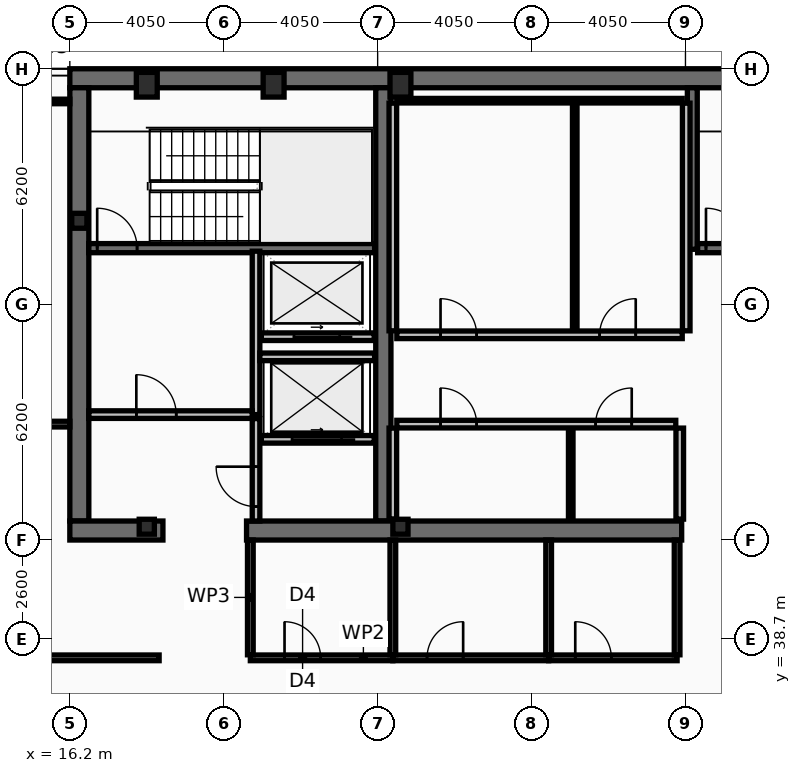
"""IFC4 building model, lengths in metres.
Left out: names, types, materials, properties, quantities, classifications, styles, units other than length and angle.
Written with IfcOpenShell. Run it as: python <this file> out.ifc"""

import sys

from ifc_helpers import new_model, si_unit, direction, frame, frame_2d, origin, origin_2d, place, context, subcontext, project, spatial, rectangle, hollow_rectangle, i_section, extrude, element, fill, save


model = new_model("IFC4")
c1 = context("Model", 3, precision=1e-05, world=origin(), true_north=direction((0.0, 1.0)))
c2 = subcontext(c1, "Body", "Model", "MODEL_VIEW")
j1 = project(units=[si_unit("LENGTHUNIT", "METRE"), si_unit("PLANEANGLEUNIT", "RADIAN")], contexts=[c1])
p1 = place(None, origin())
s1 = spatial("IfcSite", under=j1, at=p1, CompositionType="ELEMENT")
p2 = place(p1, origin())
s2 = spatial("IfcBuilding", under=s1, at=p2, CompositionType="ELEMENT")
p3 = place(p2, frame((0.0, 0.0, 298.6)))
s3 = spatial("IfcBuildingStorey", under=s2, at=p3, CompositionType="ELEMENT", Elevation=298.6)
p4 = place(p3, frame((16.2, 53.45, 0.0), z_axis=(0.0, 0.0, 1.0), x_axis=(1.0, 0.0, 0.0)))
e1 = element("IfcWall", 1, at=p4, inside=s3, PredefinedType="SHEAR", context=c2, shape_type="SweptSolid", body=[
    extrude(rectangle(XDim=40.5, YDim=0.5, at=frame_2d((20.25, 0.0))), origin(), (0.0, 0.0, 1.0), 3.44),
])
p5 = place(p3, frame((16.45, 41.8, 0.0), z_axis=(0.0, 0.0, 1.0), x_axis=(0.0, 1.0, 0.0)))
e2 = element("IfcWall", 2, at=p5, inside=s3, PredefinedType="SHEAR", context=c2, shape_type="SweptSolid", body=[
    extrude(rectangle(XDim=11.4, YDim=0.5, at=frame_2d((5.7, 0.0))), origin(), (0.0, 0.0, 1.0), 3.44),
])
p6 = place(p3, frame((24.45, 41.8, 0.0), z_axis=(0.0, 0.0, 1.0), x_axis=(0.0, 1.0, 0.0)))
e3 = element("IfcWall", 3, at=p6, inside=s3, PredefinedType="SHEAR", context=c2, shape_type="SweptSolid", body=[
    extrude(rectangle(XDim=11.4, YDim=0.4, at=frame_2d((5.7, 0.0))), origin(), (0.0, 0.0, 1.0), 3.44),
])
p7 = place(p3, frame((18.65, 41.55, 0.0), z_axis=(0.0, 0.0, 1.0), x_axis=(-1.0, 0.0, 0.0)))
e4 = element("IfcWall", 4, at=p7, inside=s3, PredefinedType="SHEAR", context=c2, shape_type="SweptSolid", body=[
    extrude(rectangle(XDim=2.45, YDim=0.5, at=frame_2d((1.225, 0.0))), origin(), (0.0, 0.0, 1.0), 3.44),
])
p8 = place(p3, frame((32.3, 41.55, 0.0), z_axis=(0.0, 0.0, 1.0), x_axis=(-1.0, 0.0, 0.0)))
e5 = element("IfcWall", 5, at=p8, inside=s3, PredefinedType="SHEAR", context=c2, shape_type="SweptSolid", body=[
    extrude(rectangle(XDim=11.45, YDim=0.5, at=frame_2d((5.725, 0.0))), origin(), (0.0, 0.0, 1.0), 3.44),
])
p9 = place(p3, frame((32.58, 48.95, 0.0), z_axis=(0.0, 0.0, 1.0), x_axis=(0.0, 1.0, 0.0)))
e6 = element("IfcWall", 6, at=p9, inside=s3, PredefinedType="SHEAR", context=c2, shape_type="SweptSolid", body=[
    extrude(rectangle(XDim=4.25, YDim=0.26, at=frame_2d((2.125, 0.0))), origin(), (0.0, 0.0, 1.0), 3.44),
])
p10 = place(p3, frame((16.7, 48.98, 0.0), z_axis=(0.0, 0.0, 1.0), x_axis=(1.0, 0.0, 0.0)))
e7 = element("IfcWall", 7, at=p10, inside=s3, PredefinedType="SHEAR", context=c2, shape_type="SweptSolid", body=[
    extrude(rectangle(XDim=7.52, YDim=0.24, at=frame_2d((3.76, 0.0))), origin(), (0.0, 0.0, 1.0), 3.44),
])
p11 = place(p10, frame((0.22, 0.0, 0.0)))
e8 = element("IfcOpeningElement", 8, at=p11, cuts=e7, PredefinedType="OPENING", context=c2, shape_type="SweptSolid", body=[
    extrude(rectangle(XDim=1.05, YDim=2.15, at=frame_2d((0.525, 1.075))), frame((0.0, 0.13, 0.0), z_axis=(0.0, -1.0, 0.0), x_axis=(1.0, 0.0, 0.0)), (0.0, 0.0, 1.0), 0.26),
])
p12 = place(p3, frame((32.72, 48.98, 0.0), z_axis=(0.0, 0.0, 1.0), x_axis=(1.0, 0.0, 0.0)))
e9 = element("IfcWall", 9, at=p12, inside=s3, PredefinedType="SHEAR", context=c2, shape_type="SweptSolid", body=[
    extrude(rectangle(XDim=7.56, YDim=0.24, at=frame_2d((3.78, 0.0))), origin(), (0.0, 0.0, 1.0), 3.44),
])
p13 = place(p12, frame((0.22, 0.0, 0.0)))
e10 = element("IfcOpeningElement", 10, at=p13, cuts=e9, PredefinedType="OPENING", context=c2, shape_type="SweptSolid", body=[
    extrude(rectangle(XDim=1.05, YDim=2.15, at=frame_2d((0.525, 1.075))), frame((0.0, 0.13, 0.0), z_axis=(0.0, -1.0, 0.0), x_axis=(1.0, 0.0, 0.0)), (0.0, 0.0, 1.0), 0.26),
])
for number, where, z_axis, x_axis in (
    (11, (18.225, 53.28, 0.0), (0.0, 0.0, 1.0), (1.0, 0.0, 0.0)),
    (12, (21.562, 53.28, 0.0), (0.0, 0.0, 1.0), (1.0, 0.0, 0.0)),
    (13, (24.9, 53.28, 0.0), (0.0, 0.0, 1.0), (1.0, 0.0, 0.0)),
):
    element("IfcColumn", number, at=place(p3, frame(where, z_axis=z_axis, x_axis=x_axis)), inside=s3, PredefinedType="COLUMN", context=c2, shape_type="SweptSolid", body=[
        extrude(hollow_rectangle(XDim=0.55, YDim=0.65, WallThickness=0.04, at=origin_2d()), origin(), (0.0, 0.0, 1.0), 3.6),
    ])
for number, where, z_axis, x_axis in (
    (14, (16.45, 49.7, 0.0), (0.0, 0.0, 1.0), (1.0, 0.0, 0.0)),
    (15, (18.225, 41.65, 0.0), (0.0, 0.0, 1.0), (1.0, 0.0, 0.0)),
    (16, (24.9, 41.65, 0.0), (0.0, 0.0, 1.0), (1.0, 0.0, 0.0)),
):
    element("IfcColumn", number, at=place(p3, frame(where, z_axis=z_axis, x_axis=x_axis)), inside=s3, PredefinedType="COLUMN", context=c2, shape_type="SweptSolid", body=[
        extrude(i_section(OverallWidth=0.399, OverallDepth=0.393, WebThickness=0.023, FlangeThickness=0.037, at=origin_2d()), origin(), (0.0, 0.0, 1.0), 3.6),
    ])
p14 = place(p3, frame((24.21, 43.95, 0.0), z_axis=(0.0, 0.0, 1.0), x_axis=(-1.0, 0.0, 0.0)))
e17 = element("IfcWall", 17, at=p14, inside=s3, PredefinedType="PARTITIONING", context=c2, shape_type="SweptSolid", body=[
    extrude(rectangle(XDim=2.97, YDim=0.2, at=frame_2d((1.485, 0.0))), origin(), (0.0, 0.0, 1.0), 3.44),
])
p15 = place(p14, frame((0.86, 0.0, 0.0)))
e18 = element("IfcOpeningElement", 18, at=p15, cuts=e17, PredefinedType="OPENING", context=c2, shape_type="SweptSolid", body=[
    extrude(rectangle(XDim=1.3, YDim=2.18, at=frame_2d((0.65, 1.09))), frame((0.0, 0.11, 0.0), z_axis=(0.0, -1.0, 0.0), x_axis=(1.0, 0.0, 0.0)), (0.0, 0.0, 1.0), 0.22),
])
p16 = place(p3, frame((24.21, 46.65, 0.0), z_axis=(0.0, 0.0, 1.0), x_axis=(-1.0, 0.0, 0.0)))
e19 = element("IfcWall", 19, at=p16, inside=s3, PredefinedType="PARTITIONING", context=c2, shape_type="SweptSolid", body=[
    extrude(rectangle(XDim=2.97, YDim=0.2, at=frame_2d((1.485, 0.0))), origin(), (0.0, 0.0, 1.0), 3.44),
])
p17 = place(p16, frame((0.91, 0.0, 0.0)))
e20 = element("IfcOpeningElement", 20, at=p17, cuts=e19, PredefinedType="OPENING", context=c2, shape_type="SweptSolid", body=[
    extrude(rectangle(XDim=1.2, YDim=2.18, at=frame_2d((0.6, 1.09))), frame((0.0, 0.11, 0.0), z_axis=(0.0, -1.0, 0.0), x_axis=(1.0, 0.0, 0.0)), (0.0, 0.0, 1.0), 0.22),
])
p18 = place(p3, frame((21.1, 44.6, 0.0), z_axis=(0.0, 0.0, 1.0), x_axis=(0.0, 1.0, 0.0)))
e21 = element("IfcWall", 21, at=p18, inside=s3, PredefinedType="PARTITIONING", context=c2, shape_type="SweptSolid", body=[
    extrude(rectangle(XDim=4.3, YDim=0.2, at=frame_2d((2.15, 0.0))), origin(), (0.0, 0.0, 1.0), 3.44),
])
p19 = place(p3, frame((16.7, 44.6, 0.0), z_axis=(0.0, 0.0, 1.0), x_axis=(1.0, 0.0, 0.0)))
e22 = element("IfcWall", 22, at=p19, inside=s3, PredefinedType="PARTITIONING", context=c2, shape_type="SweptSolid", body=[
    extrude(rectangle(XDim=4.3, YDim=0.2, at=frame_2d((2.15, 0.0))), origin(), (0.0, 0.0, 1.0), 3.44),
])
p20 = place(p19, frame((1.25, 0.0, 0.0)))
e23 = element("IfcOpeningElement", 23, at=p20, cuts=e22, PredefinedType="OPENING", context=c2, shape_type="SweptSolid", body=[
    extrude(rectangle(XDim=1.05, YDim=2.15, at=frame_2d((0.525, 1.075))), frame((0.0, 0.11, 0.0), z_axis=(0.0, -1.0, 0.0), x_axis=(1.0, 0.0, 0.0)), (0.0, 0.0, 1.0), 0.22),
])
p21 = place(p3, frame((21.2, 46.12, 0.0), z_axis=(0.0, 0.0, 1.0), x_axis=(1.0, 0.0, 0.0)))
e24 = element("IfcWall", 24, at=p21, inside=s3, PredefinedType="PARTITIONING", context=c2, shape_type="SweptSolid", body=[
    extrude(rectangle(XDim=3.02, YDim=0.2, at=frame_2d((1.51, 0.0))), origin(), (0.0, 0.0, 1.0), 3.44),
])
p22 = place(p3, frame((21.1, 41.8, 0.0), z_axis=(0.0, 0.0, 1.0), x_axis=(0.0, 1.0, 0.0)))
e25 = element("IfcWall", 25, at=p22, inside=s3, PredefinedType="PARTITIONING", context=c2, shape_type="SweptSolid", body=[
    extrude(rectangle(XDim=2.695, YDim=0.2, at=frame_2d((1.348, 0.0))), origin(), (0.0, 0.0, 1.0), 3.44),
])
p23 = place(p22, frame((0.38, 0.0, 0.0)))
e26 = element("IfcOpeningElement", 26, at=p23, cuts=e25, PredefinedType="OPENING", context=c2, shape_type="SweptSolid", body=[
    extrude(rectangle(XDim=1.05, YDim=2.15, at=frame_2d((0.525, 1.075))), frame((0.0, 0.11, 0.0), z_axis=(0.0, -1.0, 0.0), x_axis=(1.0, 0.0, 0.0)), (0.0, 0.0, 1.0), 0.22),
])
for number, where, z_axis, x_axis in (
    (27, (24.7, 46.805, 0.0), (0.0, 0.0, 1.0), (0.0, 1.0, 0.0)),
    (28, (32.42, 46.805, 0.0), (0.0, 0.0, 1.0), (0.0, 1.0, 0.0)),
):
    element("IfcWall", number, at=place(p3, frame(where, z_axis=z_axis, x_axis=x_axis)), inside=s3, PredefinedType="PARTITIONING", context=c2, shape_type="SweptSolid", body=[
        extrude(rectangle(XDim=5.99, YDim=0.2, at=frame_2d((2.995, 0.0))), origin(), (0.0, 0.0, 1.0), 3.44),
    ])
p24 = place(p3, frame((24.805, 52.86, 0.0), z_axis=(0.0, 0.0, 1.0), x_axis=(1.0, 0.0, 0.0)))
e29 = element("IfcWall", 29, at=p24, inside=s3, PredefinedType="PARTITIONING", context=c2, shape_type="SweptSolid", body=[
    extrude(rectangle(XDim=7.51, YDim=0.12, at=frame_2d((3.755, 0.0))), origin(), (0.0, 0.0, 1.0), 3.44),
])
p25 = place(p3, frame((29.486, 46.805, 0.0), z_axis=(0.0, 0.0, 1.0), x_axis=(0.0, 1.0, 0.0)))
e30 = element("IfcWall", 30, at=p25, inside=s3, PredefinedType="PARTITIONING", context=c2, shape_type="SweptSolid", body=[
    extrude(rectangle(XDim=5.99, YDim=0.12, at=frame_2d((2.995, 0.0))), origin(), (0.0, 0.0, 1.0), 3.44),
])
p26 = place(p3, frame((24.805, 46.7, 0.0), z_axis=(0.0, 0.0, 1.0), x_axis=(1.0, 0.0, 0.0)))
e31 = element("IfcWall", 31, at=p26, inside=s3, PredefinedType="PARTITIONING", context=c2, shape_type="SweptSolid", body=[
    extrude(rectangle(XDim=7.51, YDim=0.2, at=frame_2d((3.755, 0.0))), origin(), (0.0, 0.0, 1.0), 3.44),
])
p27 = place(p26, frame((1.15, 0.0, 0.0)))
e32 = element("IfcOpeningElement", 32, at=p27, cuts=e31, PredefinedType="OPENING", context=c2, shape_type="SweptSolid", body=[
    extrude(rectangle(XDim=0.95, YDim=2.1, at=frame_2d((0.475, 1.05))), frame((0.0, 0.11, 0.0), z_axis=(0.0, -1.0, 0.0), x_axis=(1.0, 0.0, 0.0)), (0.0, 0.0, 1.0), 0.22),
])
p28 = place(p26, frame((5.336, 0.0, 0.0)))
e33 = element("IfcOpeningElement", 33, at=p28, cuts=e31, PredefinedType="OPENING", context=c2, shape_type="SweptSolid", body=[
    extrude(rectangle(XDim=0.95, YDim=2.1, at=frame_2d((0.475, 1.05))), frame((0.0, 0.11, 0.0), z_axis=(0.0, -1.0, 0.0), x_axis=(1.0, 0.0, 0.0)), (0.0, 0.0, 1.0), 0.22),
])
for number, where, z_axis, x_axis in (
    (34, (24.7, 41.85, 0.0), (0.0, 0.0, 1.0), (0.0, 1.0, 0.0)),
    (35, (32.25, 41.85, 0.0), (0.0, 0.0, 1.0), (0.0, 1.0, 0.0)),
):
    element("IfcWall", number, at=place(p3, frame(where, z_axis=z_axis, x_axis=x_axis)), inside=s3, PredefinedType="PARTITIONING", context=c2, shape_type="SweptSolid", body=[
        extrude(rectangle(XDim=2.395, YDim=0.2, at=frame_2d((1.198, 0.0))), origin(), (0.0, 0.0, 1.0), 3.44),
    ])
p29 = place(p3, frame((29.381, 41.85, 0.0), z_axis=(0.0, 0.0, 1.0), x_axis=(0.0, 1.0, 0.0)))
e36 = element("IfcWall", 36, at=p29, inside=s3, PredefinedType="PARTITIONING", context=c2, shape_type="SweptSolid", body=[
    extrude(rectangle(XDim=2.395, YDim=0.12, at=frame_2d((1.198, 0.0))), origin(), (0.0, 0.0, 1.0), 3.44),
])
p30 = place(p3, frame((24.805, 44.35, 0.0), z_axis=(0.0, 0.0, 1.0), x_axis=(1.0, 0.0, 0.0)))
e37 = element("IfcWall", 37, at=p30, inside=s3, PredefinedType="PARTITIONING", context=c2, shape_type="SweptSolid", body=[
    extrude(rectangle(XDim=7.34, YDim=0.2, at=frame_2d((3.67, 0.0))), origin(), (0.0, 0.0, 1.0), 3.44),
])
p31 = place(p30, frame((1.15, 0.0, 0.0)))
e38 = element("IfcOpeningElement", 38, at=p31, cuts=e37, PredefinedType="OPENING", context=c2, shape_type="SweptSolid", body=[
    extrude(rectangle(XDim=0.95, YDim=2.1, at=frame_2d((0.475, 1.05))), frame((0.0, 0.11, 0.0), z_axis=(0.0, -1.0, 0.0), x_axis=(1.0, 0.0, 0.0)), (0.0, 0.0, 1.0), 0.22),
])
p32 = place(p30, frame((5.231, 0.0, 0.0)))
e39 = element("IfcOpeningElement", 39, at=p32, cuts=e37, PredefinedType="OPENING", context=c2, shape_type="SweptSolid", body=[
    extrude(rectangle(XDim=0.95, YDim=2.1, at=frame_2d((0.475, 1.05))), frame((0.0, 0.11, 0.0), z_axis=(0.0, -1.0, 0.0), x_axis=(1.0, 0.0, 0.0)), (0.0, 0.0, 1.0), 0.22),
])
p33 = place(p3, frame((20.95, 38.2, 0.0), z_axis=(0.0, 0.0, 1.0), x_axis=(1.0, 0.0, 0.0)))
e40 = element("IfcWall", 40, at=p33, inside=s3, PredefinedType="PARTITIONING", context=c2, shape_type="SweptSolid", body=[
    extrude(rectangle(XDim=3.75, YDim=0.15, at=frame_2d((1.875, 0.0))), origin(), (0.0, 0.0, 1.0), 2.78),
])
p34 = place(p33, frame((0.9, 0.0, 0.0)))
e41 = element("IfcOpeningElement", 41, at=p34, cuts=e40, PredefinedType="OPENING", context=c2, shape_type="SweptSolid", body=[
    extrude(rectangle(XDim=0.95, YDim=2.05, at=frame_2d((0.475, 1.025))), frame((0.0, 0.085, 0.0), z_axis=(0.0, -1.0, 0.0), x_axis=(1.0, 0.0, 0.0)), (0.0, 0.0, 1.0), 0.17),
])
p35 = place(p3, frame((24.7, 38.2, 0.0), z_axis=(0.0, 0.0, 1.0), x_axis=(1.0, 0.0, 0.0)))
e42 = element("IfcWall", 42, at=p35, inside=s3, PredefinedType="PARTITIONING", context=c2, shape_type="SweptSolid", body=[
    extrude(rectangle(XDim=4.1, YDim=0.15, at=frame_2d((2.05, 0.0))), origin(), (0.0, 0.0, 1.0), 2.78),
])
p36 = place(p35, frame((0.9, 0.0, 0.0)))
e43 = element("IfcOpeningElement", 43, at=p36, cuts=e42, PredefinedType="OPENING", context=c2, shape_type="SweptSolid", body=[
    extrude(rectangle(XDim=0.95, YDim=2.05, at=frame_2d((0.475, 1.025))), frame((0.0, 0.085, 0.0), z_axis=(0.0, -1.0, 0.0), x_axis=(1.0, 0.0, 0.0)), (0.0, 0.0, 1.0), 0.17),
])
p37 = place(p3, frame((28.8, 38.2, 0.0), z_axis=(0.0, 0.0, 1.0), x_axis=(1.0, 0.0, 0.0)))
e44 = element("IfcWall", 44, at=p37, inside=s3, PredefinedType="PARTITIONING", context=c2, shape_type="SweptSolid", body=[
    extrude(rectangle(XDim=3.38, YDim=0.15, at=frame_2d((1.69, 0.0))), origin(), (0.0, 0.0, 1.0), 2.78),
])
p38 = place(p37, frame((0.7, 0.0, 0.0)))
e45 = element("IfcOpeningElement", 45, at=p38, cuts=e44, PredefinedType="OPENING", context=c2, shape_type="SweptSolid", body=[
    extrude(rectangle(XDim=0.95, YDim=2.05, at=frame_2d((0.475, 1.025))), frame((0.0, 0.085, 0.0), z_axis=(0.0, -1.0, 0.0), x_axis=(1.0, 0.0, 0.0)), (0.0, 0.0, 1.0), 0.17),
])
p39 = place(p3, frame((20.95, 38.28, 0.0), z_axis=(0.0, 0.0, 1.0), x_axis=(0.0, 1.0, 0.0)))
e46 = element("IfcWall", 46, at=p39, inside=s3, PredefinedType="PARTITIONING", context=c2, shape_type="SweptSolid", body=[
    extrude(rectangle(XDim=3.02, YDim=0.15, at=frame_2d((1.51, 0.0))), origin(), (0.0, 0.0, 1.0), 3.44),
])
p40 = place(p3, frame((24.7, 38.28, 0.0), z_axis=(0.0, 0.0, 1.0), x_axis=(0.0, 1.0, 0.0)))
e47 = element("IfcWall", 47, at=p40, inside=s3, PredefinedType="PARTITIONING", context=c2, shape_type="SweptSolid", body=[
    extrude(rectangle(XDim=3.02, YDim=0.15, at=frame_2d((1.51, 0.0))), origin(), (0.0, 0.0, 1.0), 2.78),
])
for number, where, z_axis, x_axis in (
    (48, (28.8, 38.28, 0.0), (0.0, 0.0, 1.0), (0.0, 1.0, 0.0)),
    (49, (32.18, 38.28, 0.0), (0.0, 0.0, 1.0), (0.0, 1.0, 0.0)),
):
    element("IfcWall", number, at=place(p3, frame(where, z_axis=z_axis, x_axis=x_axis)), inside=s3, PredefinedType="PARTITIONING", context=c2, shape_type="SweptSolid", body=[
        extrude(rectangle(XDim=3.02, YDim=0.15, at=frame_2d((1.51, 0.0))), origin(), (0.0, 0.0, 1.0), 3.44),
    ])
p41 = place(p3, frame((12.03, 38.2, 0.0), z_axis=(0.0, 0.0, 1.0), x_axis=(1.0, 0.0, 0.0)))
e50 = element("IfcWall", 50, at=p41, inside=s3, PredefinedType="PARTITIONING", context=c2, shape_type="SweptSolid", body=[
    extrude(rectangle(XDim=6.52, YDim=0.15, at=frame_2d((3.26, 0.0))), origin(), (0.0, 0.0, 1.0), 2.78),
])
p42 = place(p41, frame((2.32, 0.0, 0.0)))
e51 = element("IfcOpeningElement", 51, at=p42, cuts=e50, PredefinedType="OPENING", context=c2, shape_type="SweptSolid", body=[
    extrude(rectangle(XDim=0.95, YDim=2.05, at=frame_2d((0.475, 1.025))), frame((0.0, 0.085, 0.0), z_axis=(0.0, -1.0, 0.0), x_axis=(1.0, 0.0, 0.0)), (0.0, 0.0, 1.0), 0.17),
])
p43 = place(p3, frame((12.095, 44.35, 0.0), z_axis=(0.0, 0.0, 1.0), x_axis=(1.0, 0.0, 0.0)))
e52 = element("IfcWall", 52, at=p43, inside=s3, PredefinedType="PARTITIONING", context=c2, shape_type="SweptSolid", body=[
    extrude(rectangle(XDim=4.105, YDim=0.15, at=frame_2d((2.052, 0.0))), origin(), (0.0, 0.0, 1.0), 2.88),
])
p44 = place(p43, frame((2.32, 0.0, 0.0)))
e53 = element("IfcOpeningElement", 53, at=p44, cuts=e52, PredefinedType="OPENING", context=c2, shape_type="SweptSolid", body=[
    extrude(rectangle(XDim=0.9, YDim=2.05, at=frame_2d((0.45, 1.025))), frame((0.0, 0.085, 0.0), z_axis=(0.0, -1.0, 0.0), x_axis=(1.0, 0.0, 0.0)), (0.0, 0.0, 1.0), 0.17),
])
p45 = place(p3, frame((12.095, 52.84, 0.0), z_axis=(0.0, 0.0, 1.0), x_axis=(1.0, 0.0, 0.0)))
e54 = element("IfcWall", 54, at=p45, inside=s3, PredefinedType="PARTITIONING", context=c2, shape_type="SweptSolid", body=[
    extrude(rectangle(XDim=4.105, YDim=0.12, at=frame_2d((2.052, 0.0))), origin(), (0.0, 0.0, 1.0), 3.44),
])
p46 = place(p11, origin())
e55 = element("IfcDoor", 55, at=p46, inside=s3, OperationType="SINGLE_SWING_LEFT", PredefinedType="DOOR", context=c2, shape_type="SweptSolid", body=[
    extrude(rectangle(XDim=1.05, YDim=2.15, at=frame_2d((0.525, 1.075))), frame((0.0, 0.025, 0.0), z_axis=(0.0, -1.0, 0.0), x_axis=(1.0, 0.0, 0.0)), (0.0, 0.0, 1.0), 0.05),
])
fill(e8, e55)
p47 = place(p13, origin())
e56 = element("IfcDoor", 56, at=p47, inside=s3, OperationType="SINGLE_SWING_LEFT", PredefinedType="DOOR", context=c2, shape_type="SweptSolid", body=[
    extrude(rectangle(XDim=1.05, YDim=2.15, at=frame_2d((0.525, 1.075))), frame((0.0, 0.025, 0.0), z_axis=(0.0, -1.0, 0.0), x_axis=(1.0, 0.0, 0.0)), (0.0, 0.0, 1.0), 0.05),
])
fill(e10, e56)
p48 = place(p15, origin())
e57 = element("IfcDoor", 57, at=p48, inside=s3, OperationType="SLIDING_TO_LEFT", PredefinedType="DOOR", context=c2, shape_type="SweptSolid", body=[
    extrude(rectangle(XDim=1.3, YDim=2.18, at=frame_2d((0.65, 1.09))), frame((0.0, 0.025, 0.0), z_axis=(0.0, -1.0, 0.0), x_axis=(1.0, 0.0, 0.0)), (0.0, 0.0, 1.0), 0.05),
])
fill(e18, e57)
p49 = place(p17, origin())
e58 = element("IfcDoor", 58, at=p49, inside=s3, OperationType="SLIDING_TO_LEFT", PredefinedType="DOOR", context=c2, shape_type="SweptSolid", body=[
    extrude(rectangle(XDim=1.2, YDim=2.18, at=frame_2d((0.6, 1.09))), frame((0.0, 0.025, 0.0), z_axis=(0.0, -1.0, 0.0), x_axis=(1.0, 0.0, 0.0)), (0.0, 0.0, 1.0), 0.05),
])
fill(e20, e58)
p50 = place(p20, origin())
e59 = element("IfcDoor", 59, at=p50, inside=s3, OperationType="SINGLE_SWING_LEFT", PredefinedType="DOOR", context=c2, shape_type="SweptSolid", body=[
    extrude(rectangle(XDim=1.05, YDim=2.15, at=frame_2d((0.525, 1.075))), frame((0.0, 0.025, 0.0), z_axis=(0.0, -1.0, 0.0), x_axis=(1.0, 0.0, 0.0)), (0.0, 0.0, 1.0), 0.05),
])
fill(e23, e59)
p51 = place(p23, origin())
e60 = element("IfcDoor", 60, at=p51, inside=s3, OperationType="SINGLE_SWING_RIGHT", PredefinedType="DOOR", context=c2, shape_type="SweptSolid", body=[
    extrude(rectangle(XDim=1.05, YDim=2.15, at=frame_2d((0.525, 1.075))), frame((0.0, 0.025, 0.0), z_axis=(0.0, -1.0, 0.0), x_axis=(1.0, 0.0, 0.0)), (0.0, 0.0, 1.0), 0.05),
])
fill(e26, e60)
p52 = place(p27, origin())
e61 = element("IfcDoor", 61, at=p52, inside=s3, OperationType="SINGLE_SWING_LEFT", PredefinedType="DOOR", context=c2, shape_type="SweptSolid", body=[
    extrude(rectangle(XDim=0.95, YDim=2.1, at=frame_2d((0.475, 1.05))), frame((0.0, 0.025, 0.0), z_axis=(0.0, -1.0, 0.0), x_axis=(1.0, 0.0, 0.0)), (0.0, 0.0, 1.0), 0.05),
])
fill(e32, e61)
p53 = place(p28, origin())
e62 = element("IfcDoor", 62, at=p53, inside=s3, OperationType="SINGLE_SWING_RIGHT", PredefinedType="DOOR", context=c2, shape_type="SweptSolid", body=[
    extrude(rectangle(XDim=0.95, YDim=2.1, at=frame_2d((0.475, 1.05))), frame((0.0, 0.025, 0.0), z_axis=(0.0, -1.0, 0.0), x_axis=(1.0, 0.0, 0.0)), (0.0, 0.0, 1.0), 0.05),
])
fill(e33, e62)
p54 = place(p31, origin())
e63 = element("IfcDoor", 63, at=p54, inside=s3, OperationType="SINGLE_SWING_LEFT", PredefinedType="DOOR", context=c2, shape_type="SweptSolid", body=[
    extrude(rectangle(XDim=0.95, YDim=2.1, at=frame_2d((0.475, 1.05))), frame((0.0, 0.025, 0.0), z_axis=(0.0, -1.0, 0.0), x_axis=(1.0, 0.0, 0.0)), (0.0, 0.0, 1.0), 0.05),
])
fill(e38, e63)
p55 = place(p32, origin())
e64 = element("IfcDoor", 64, at=p55, inside=s3, OperationType="SINGLE_SWING_RIGHT", PredefinedType="DOOR", context=c2, shape_type="SweptSolid", body=[
    extrude(rectangle(XDim=0.95, YDim=2.1, at=frame_2d((0.475, 1.05))), frame((0.0, 0.025, 0.0), z_axis=(0.0, -1.0, 0.0), x_axis=(1.0, 0.0, 0.0)), (0.0, 0.0, 1.0), 0.05),
])
fill(e39, e64)
p56 = place(p34, origin())
e65 = element("IfcDoor", 65, at=p56, inside=s3, OperationType="SINGLE_SWING_LEFT", PredefinedType="DOOR", context=c2, shape_type="SweptSolid", body=[
    extrude(rectangle(XDim=0.95, YDim=2.05, at=frame_2d((0.475, 1.025))), frame((0.0, 0.025, 0.0), z_axis=(0.0, -1.0, 0.0), x_axis=(1.0, 0.0, 0.0)), (0.0, 0.0, 1.0), 0.05),
])
fill(e41, e65)
p57 = place(p36, origin())
e66 = element("IfcDoor", 66, at=p57, inside=s3, OperationType="SINGLE_SWING_RIGHT", PredefinedType="DOOR", context=c2, shape_type="SweptSolid", body=[
    extrude(rectangle(XDim=0.95, YDim=2.05, at=frame_2d((0.475, 1.025))), frame((0.0, 0.025, 0.0), z_axis=(0.0, -1.0, 0.0), x_axis=(1.0, 0.0, 0.0)), (0.0, 0.0, 1.0), 0.05),
])
fill(e43, e66)
p58 = place(p38, origin())
e67 = element("IfcDoor", 67, at=p58, inside=s3, OperationType="SINGLE_SWING_LEFT", PredefinedType="DOOR", context=c2, shape_type="SweptSolid", body=[
    extrude(rectangle(XDim=0.95, YDim=2.05, at=frame_2d((0.475, 1.025))), frame((0.0, 0.025, 0.0), z_axis=(0.0, -1.0, 0.0), x_axis=(1.0, 0.0, 0.0)), (0.0, 0.0, 1.0), 0.05),
])
fill(e45, e67)
save(model, sys.argv[1])
